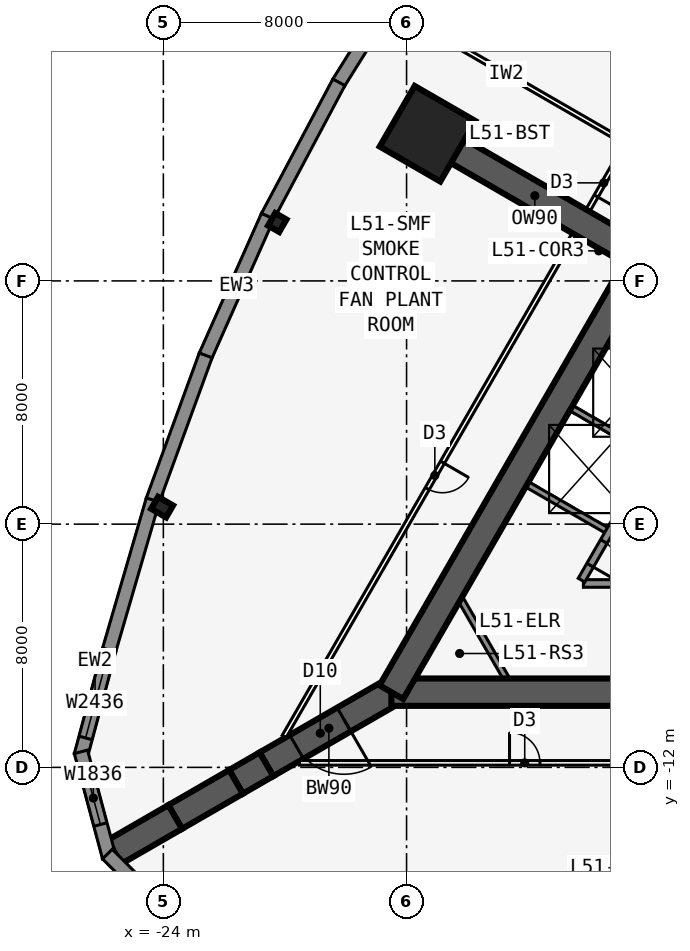
"""IFC4 building model, lengths in metres.
Left out: names, types, materials, properties, quantities, classifications, styles, units other than length and angle.
Written with IfcOpenShell. Run it as: python <this file> out.ifc"""

import sys

from ifc_helpers import new_model, si_unit, direction, frame, frame_2d, origin, origin_2d, place, context, subcontext, project, spatial, polyline, rectangle, i_section, outline, extrude, element, fill, save


model = new_model("IFC4")
c1 = context("Model", 3, precision=1e-05, world=origin(), true_north=direction((0.0, 1.0)))
c2 = subcontext(c1, "Body", "Model", "MODEL_VIEW")
j1 = project(units=[si_unit("LENGTHUNIT", "METRE"), si_unit("PLANEANGLEUNIT", "RADIAN")], contexts=[c1])
p1 = place(None, origin())
s1 = spatial("IfcSite", under=j1, at=p1, CompositionType="ELEMENT")
p2 = place(p1, origin())
s2 = spatial("IfcBuilding", under=s1, at=p2, CompositionType="ELEMENT")
p3 = place(p2, frame((0.0, 0.0, 189.5)))
s3 = spatial("IfcBuildingStorey", under=s2, at=p3, CompositionType="ELEMENT", Elevation=189.5)
p4 = place(p3, frame((-16.5, -9.526, 0.0), z_axis=(0.0, 0.0, 1.0), x_axis=(1.0, 0.0, 0.0)))
e1 = element("IfcWall", 1, at=p4, inside=s3, PredefinedType="SHEAR", context=c2, shape_type="SweptSolid", body=[
    extrude(rectangle(XDim=16.5, YDim=0.9, at=frame_2d((8.25, 0.0))), origin(), (0.0, 0.0, 1.0), 6.4),
])
p5 = place(p4, frame((14.05, 0.0, 0.0)))
e2 = element("IfcOpeningElement", 2, at=p5, cuts=e1, PredefinedType="OPENING", context=c2, shape_type="SweptSolid", body=[
    extrude(rectangle(XDim=1.8, YDim=2.13, at=frame_2d((0.9, 1.065))), frame((0.0, 0.46, 0.0), z_axis=(0.0, -1.0, 0.0), x_axis=(1.0, 0.0, 0.0)), (0.0, 0.0, 1.0), 0.92),
])
p6 = place(p3, frame((-10.183, -5.951, 0.0), z_axis=(0.0, 0.0, 1.0), x_axis=(1.0, 0.0, 0.0)))
e3 = element("IfcWall", 3, at=p6, inside=s3, PredefinedType="SOLIDWALL", context=c2, shape_type="SweptSolid", body=[
    extrude(rectangle(XDim=7.633, YDim=0.25, at=frame_2d((3.816, 0.0))), origin(), (0.0, 0.0, 1.0), 6.15),
])
p7 = place(p3, frame((-8.25, 4.763, 0.0), z_axis=(0.0, 0.0, 1.0), x_axis=(-0.499996545922, -0.866027397988, 0.0)))
e4 = element("IfcWall", 4, at=p7, inside=s3, PredefinedType="SHEAR", context=c2, shape_type="SweptSolid", body=[
    extrude(rectangle(XDim=16.5, YDim=0.9, at=frame_2d((8.25, 0.0))), origin(), (0.0, 0.0, 1.0), 6.4),
])
p8 = place(p3, frame((-4.929, 3.365, 0.0), z_axis=(0.0, 0.0, 1.0), x_axis=(-0.499991433582, -0.866030349552, 0.0)))
e5 = element("IfcWall", 5, at=p8, inside=s3, PredefinedType="SOLIDWALL", context=c2, shape_type="SweptSolid", body=[
    extrude(rectangle(XDim=10.633, YDim=0.25, at=frame_2d((5.316, 0.0))), origin(), (0.0, 0.0, 1.0), 6.15),
])
p9 = place(p8, frame((9.164, 0.0, 0.0)))
e6 = element("IfcOpeningElement", 6, at=p9, cuts=e5, PredefinedType="OPENING", context=c2, shape_type="SweptSolid", body=[
    extrude(rectangle(XDim=0.9, YDim=2.13, at=frame_2d((0.45, 1.065))), frame((0.0, 0.135, 0.0), z_axis=(0.0, -1.0, 0.0), x_axis=(1.0, 0.0, 0.0)), (0.0, 0.0, 1.0), 0.27),
])
for number, where, z_axis, x_axis in (
    (7, (-7.879, -1.744, 0.0), (0.0, 0.0, 1.0), (-0.866, 0.5, 0.0)),
    (8, (-9.329, -4.256, 0.0), (0.0, 0.0, 1.0), (-0.866, 0.5, 0.0)),
):
    element("IfcWall", number, at=place(p3, frame(where, z_axis=z_axis, x_axis=x_axis)), inside=s3, PredefinedType="SOLIDWALL", context=c2, shape_type="SweptSolid", body=[
        extrude(rectangle(XDim=3.125, YDim=0.2, at=frame_2d((1.562, 0.0))), origin(), (0.0, 0.0, 1.0), 6.15),
    ])
p10 = place(p3, frame((-16.5, -9.526, 0.0), z_axis=(0.0, 0.0, 1.0), x_axis=(-0.866031398331, -0.499989616998, 0.0)))
e9 = element("IfcWall", 9, at=p10, inside=s3, PredefinedType="SHEAR", context=c2, shape_type="SweptSolid", body=[
    extrude(rectangle(XDim=4.746, YDim=0.9, at=frame_2d((2.373, 0.0))), origin(), (0.0, 0.0, 1.0), 6.4),
])
p11 = place(p10, frame((1.8, 0.0, 0.0)))
e10 = element("IfcOpeningElement", 10, at=p11, cuts=e9, PredefinedType="OPENING", context=c2, shape_type="SweptSolid", body=[
    extrude(rectangle(XDim=1.8, YDim=2.13, at=frame_2d((0.9, 1.065))), frame((0.0, 0.46, 0.0), z_axis=(0.0, -1.0, 0.0), x_axis=(1.0, 0.0, 0.0)), (0.0, 0.0, 1.0), 0.92),
])
p12 = place(p3, frame((-20.61, -11.899, 0.0), z_axis=(0.0, 0.0, 1.0), x_axis=(-0.866009537788, -0.500027479704, 0.0)))
e11 = element("IfcWall", 11, at=p12, inside=s3, PredefinedType="SHEAR", context=c2, shape_type="SweptSolid", body=[
    extrude(rectangle(XDim=1.155, YDim=0.9, at=frame_2d((0.577, 0.0))), origin(), (0.0, 0.0, 1.0), 6.4),
])
for number, where, z_axis, x_axis in (
    (12, (-21.61, -12.477, 0.0), (0.0, 0.0, 1.0), (-0.866, -0.5, 0.0)),
    (13, (-23.61, -13.631, 0.0), (0.0, 0.0, 1.0), (-0.866, -0.5, 0.0)),
):
    element("IfcWall", number, at=place(p3, frame(where, z_axis=z_axis, x_axis=x_axis)), inside=s3, PredefinedType="SHEAR", context=c2, shape_type="SweptSolid", body=[
        extrude(rectangle(XDim=2.309, YDim=0.9, at=frame_2d((1.155, 0.0))), origin(), (0.0, 0.0, 1.0), 6.4),
    ])
p13 = place(p3, frame((-8.25, 4.763, 0.0), z_axis=(0.0, 0.0, 1.0), x_axis=(-0.866023543838, 0.500003221507, 0.0)))
e14 = element("IfcWall", 14, at=p13, inside=s3, PredefinedType="SHEAR", context=c2, shape_type="SweptSolid", body=[
    extrude(rectangle(XDim=8.154, YDim=0.9, at=frame_2d((4.077, 0.0))), origin(), (0.0, 0.0, 1.0), 6.4),
])
p14 = place(p3, frame((-20.254, 5.92, 0.0), z_axis=(0.0, 0.0, 1.0), x_axis=(-0.866025403784, 0.5, 0.0)))
e15 = element("IfcColumn", 15, at=p14, inside=s3, PredefinedType="COLUMN", context=c2, shape_type="SweptSolid", body=[
    extrude(i_section(OverallWidth=0.424, OverallDepth=0.475, WebThickness=0.048, FlangeThickness=0.077, at=origin_2d()), origin(), (0.0, 0.0, 1.0), 6.4),
])
p15 = place(p3, frame((-24.041, -3.44, 0.0), z_axis=(0.0, 0.0, 1.0), x_axis=(-0.5, -0.866025403784, 0.0)))
e16 = element("IfcColumn", 16, at=p15, inside=s3, PredefinedType="COLUMN", context=c2, shape_type="SweptSolid", body=[
    extrude(i_section(OverallWidth=0.455, OverallDepth=0.569, WebThickness=0.078, FlangeThickness=0.125, at=origin_2d()), origin(), (0.0, 0.0, 1.0), 6.4),
])
p16 = place(p3, frame((-15.312, 8.84, 0.0), z_axis=(0.0, 0.0, 1.0), x_axis=(-0.866025403784, 0.5, 0.0)))
e17 = element("IfcColumn", 17, at=p16, inside=s3, PredefinedType="COLUMN", context=c2, shape_type="SweptSolid", body=[
    extrude(rectangle(XDim=2.3, YDim=2.3, at=origin_2d()), origin(), (0.0, 0.0, 1.0), 6.4),
])
p17 = place(p3, frame((-15.583, 14.761, 0.0), z_axis=(0.0, 0.0, 1.0), x_axis=(-0.529990167382, -0.84800378683, 0.0)))
e18 = element("IfcWall", 18, at=p17, inside=s3, PredefinedType="SOLIDWALL", context=c2, shape_type="SweptSolid", body=[
    extrude(outline(polyline([(0.0, 0.0), (5.003, 0.0), (5.003, 6.15), (0.0, 6.15), (0.0, 0.0)]), holes=[polyline([(4.402, 3.075), (4.337, 3.567), (4.147, 4.025), (3.845, 4.418), (3.451, 4.72), (2.993, 4.91), (2.501, 4.975), (2.01, 4.91), (1.552, 4.72), (1.158, 4.418), (0.856, 4.025), (0.666, 3.567), (0.602, 3.075), (0.666, 2.583), (0.856, 2.125), (1.158, 1.731), (1.552, 1.43), (2.01, 1.24), (2.501, 1.175), (2.993, 1.24), (3.451, 1.43), (3.845, 1.731), (4.147, 2.125), (4.337, 2.583), (4.402, 3.075)])]), frame((0.0, 0.225, 0.0), z_axis=(0.0, -1.0, 0.0), x_axis=(1.0, 0.0, 0.0)), (0.0, 0.0, 1.0), 0.45),
])
p18 = place(p3, frame((-18.226, 10.532, 0.0), z_axis=(0.0, 0.0, 1.0), x_axis=(-0.469404966864, -0.882982999317, 0.0)))
e19 = element("IfcWall", 19, at=p18, inside=s3, PredefinedType="SOLIDWALL", context=c2, shape_type="SweptSolid", body=[
    extrude(outline(polyline([(0.0, 0.0), (5.003, 0.0), (5.003, 6.15), (0.0, 6.15), (0.0, 0.0)]), holes=[polyline([(4.402, 3.075), (4.337, 3.567), (4.147, 4.025), (3.845, 4.418), (3.451, 4.72), (2.993, 4.91), (2.501, 4.975), (2.01, 4.91), (1.552, 4.72), (1.158, 4.418), (0.856, 4.025), (0.666, 3.567), (0.602, 3.075), (0.666, 2.583), (0.856, 2.125), (1.158, 1.731), (1.552, 1.43), (2.01, 1.24), (2.501, 1.175), (2.993, 1.24), (3.451, 1.43), (3.845, 1.731), (4.147, 2.125), (4.337, 2.583), (4.402, 3.075)])]), frame((0.0, 0.225, 0.0), z_axis=(0.0, -1.0, 0.0), x_axis=(1.0, 0.0, 0.0)), (0.0, 0.0, 1.0), 0.45),
])
p19 = place(p3, frame((-20.568, 6.128, 0.0), z_axis=(0.0, 0.0, 1.0), x_axis=(-0.406850247885, -0.913494869058, 0.0)))
e20 = element("IfcWall", 20, at=p19, inside=s3, PredefinedType="SOLIDWALL", context=c2, shape_type="SweptSolid", body=[
    extrude(outline(polyline([(0.0, 0.0), (5.027, 0.0), (5.027, 6.15), (0.0, 6.15), (0.0, 0.0)]), holes=[polyline([(4.414, 3.075), (4.349, 3.567), (4.159, 4.025), (3.857, 4.418), (3.464, 4.72), (3.006, 4.91), (2.514, 4.975), (2.022, 4.91), (1.564, 4.72), (1.17, 4.418), (0.868, 4.025), (0.678, 3.567), (0.614, 3.075), (0.678, 2.583), (0.868, 2.125), (1.17, 1.731), (1.564, 1.43), (2.022, 1.24), (2.514, 1.175), (3.006, 1.24), (3.464, 1.43), (3.857, 1.731), (4.159, 2.125), (4.349, 2.583), (4.414, 3.075)])]), frame((0.0, 0.225, 0.0), z_axis=(0.0, -1.0, 0.0), x_axis=(1.0, 0.0, 0.0)), (0.0, 0.0, 1.0), 0.45),
])
p20 = place(p3, frame((-22.607, 1.55, 0.0), z_axis=(0.0, 0.0, 1.0), x_axis=(-0.343210088389, -0.939258662578, 0.0)))
e21 = element("IfcWall", 21, at=p20, inside=s3, PredefinedType="SOLIDWALL", context=c2, shape_type="SweptSolid", body=[
    extrude(outline(polyline([(0.0, 0.0), (5.076, 0.0), (5.076, 6.15), (0.0, 6.15), (0.0, 0.0)]), holes=[polyline([(4.438, 3.075), (4.373, 3.567), (4.184, 4.025), (3.882, 4.418), (3.488, 4.72), (3.03, 4.91), (2.538, 4.975), (2.046, 4.91), (1.588, 4.72), (1.195, 4.418), (0.893, 4.025), (0.703, 3.567), (0.638, 3.075), (0.703, 2.583), (0.893, 2.125), (1.195, 1.731), (1.588, 1.43), (2.046, 1.24), (2.538, 1.175), (3.03, 1.24), (3.488, 1.43), (3.882, 1.731), (4.184, 2.125), (4.373, 2.583), (4.438, 3.075)])]), frame((0.0, 0.225, 0.0), z_axis=(0.0, -1.0, 0.0), x_axis=(1.0, 0.0, 0.0)), (0.0, 0.0, 1.0), 0.45),
])
p21 = place(p3, frame((-24.345, -3.203, 0.0), z_axis=(0.0, 0.0, 1.0), x_axis=(-0.279528287117, -0.960137457191, 0.0)))
e22 = element("IfcWall", 22, at=p21, inside=s3, PredefinedType="SOLIDWALL", context=c2, shape_type="SweptSolid", body=[
    extrude(outline(polyline([(0.0, 0.0), (5.148, 0.0), (5.148, 6.15), (0.0, 6.15), (0.0, 0.0)]), holes=[polyline([(4.524, 3.075), (4.458, 3.58), (4.263, 4.05), (3.953, 4.454), (3.549, 4.764), (3.079, 4.958), (2.574, 5.025), (2.069, 4.958), (1.599, 4.764), (1.195, 4.454), (0.885, 4.05), (0.69, 3.58), (0.624, 3.075), (0.69, 2.57), (0.885, 2.1), (1.195, 1.696), (1.599, 1.386), (2.069, 1.191), (2.574, 1.125), (3.079, 1.191), (3.549, 1.386), (3.953, 1.696), (4.263, 2.1), (4.458, 2.57), (4.524, 3.075)])]), frame((0.0, 0.225, 0.0), z_axis=(0.0, -1.0, 0.0), x_axis=(1.0, 0.0, 0.0)), (0.0, 0.0, 1.0), 0.45),
])
p22 = place(p3, frame((-25.783, -8.141, 0.0), z_axis=(0.0, 0.0, 1.0), x_axis=(-0.258823421857, -0.965924653531, 0.0)))
e23 = element("IfcWall", 23, at=p22, inside=s3, PredefinedType="SOLIDWALL", context=c2, shape_type="SweptSolid", body=[
    extrude(rectangle(XDim=3.586, YDim=0.45, at=frame_2d((1.793, 0.0))), origin(), (0.0, 0.0, 1.0), 6.15),
])
p23 = place(p22, frame((0.593, 0.0, 1.2)))
e24 = element("IfcOpeningElement", 24, at=p23, cuts=e23, PredefinedType="OPENING", context=c2, shape_type="SweptSolid", body=[
    extrude(rectangle(XDim=2.4, YDim=3.6, at=frame_2d((1.2, 1.8))), frame((0.0, 0.235, 0.0), z_axis=(0.0, -1.0, 0.0), x_axis=(1.0, 0.0, 0.0)), (0.0, 0.0, 1.0), 0.47),
])
p24 = place(p3, frame((-26.711, -11.489, 0.0), z_axis=(0.0, 0.0, 1.0), x_axis=(0.258823421857, -0.965924653531, 0.0)))
e25 = element("IfcWall", 25, at=p24, inside=s3, PredefinedType="SOLIDWALL", context=c2, shape_type="SweptSolid", body=[
    extrude(outline(polyline([(3.586, 0.225), (3.527, 0.225), (3.035, 0.093), (3.0, 0.225), (0.0, 0.225), (0.0, -0.225), (3.586, -0.225), (3.586, 0.225)])), origin(), (0.0, 0.0, 1.0), 6.15),
])
p25 = place(p24, frame((0.675, 0.0, 1.2)))
e26 = element("IfcOpeningElement", 26, at=p25, cuts=e25, PredefinedType="OPENING", context=c2, shape_type="SweptSolid", body=[
    extrude(rectangle(XDim=1.8, YDim=3.6, at=frame_2d((0.9, 1.8))), frame((0.0, 0.235, 0.0), z_axis=(0.0, -1.0, 0.0), x_axis=(1.0, 0.0, 0.0)), (0.0, 0.0, 1.0), 0.47),
])
p26 = place(p3, frame((-25.841, -14.852, 0.0), z_axis=(0.0, 0.0, 1.0), x_axis=(0.707106781187, -0.707106781187, 0.0)))
e27 = element("IfcWall", 27, at=p26, inside=s3, PredefinedType="SOLIDWALL", context=c2, shape_type="SweptSolid", body=[
    extrude(outline(polyline([(3.586, 0.225), (0.586, 0.225), (0.551, 0.093), (0.059, 0.225), (0.0, 0.225), (0.0, -0.225), (3.586, -0.225), (3.586, 0.225)])), origin(), (0.0, 0.0, 1.0), 6.15),
])
p27 = place(p26, frame((1.111, 0.0, 1.2)))
e28 = element("IfcOpeningElement", 28, at=p27, cuts=e27, PredefinedType="OPENING", context=c2, shape_type="SweptSolid", body=[
    extrude(rectangle(XDim=1.8, YDim=3.6, at=frame_2d((0.9, 1.8))), frame((0.0, 0.235, 0.0), z_axis=(0.0, -1.0, 0.0), x_axis=(1.0, 0.0, 0.0)), (0.0, 0.0, 1.0), 0.47),
])
p28 = place(p3, frame((-19.527, -11.851, 0.0), z_axis=(0.0, 0.0, 1.0), x_axis=(1.0, 0.0, 0.0)))
e29 = element("IfcWall", 29, at=p28, inside=s3, PredefinedType="PARTITIONING", context=c2, shape_type="SweptSolid", body=[
    extrude(rectangle(XDim=39.054, YDim=0.15, at=frame_2d((19.527, 0.0))), origin(), (0.0, 0.0, 1.0), 6.15),
])
p29 = place(p28, frame((6.914, 0.0, 0.0)))
e30 = element("IfcOpeningElement", 30, at=p29, cuts=e29, PredefinedType="OPENING", context=c2, shape_type="SweptSolid", body=[
    extrude(rectangle(XDim=1.0, YDim=2.13, at=frame_2d((0.5, 1.065))), frame((0.0, 0.085, 0.0), z_axis=(0.0, -1.0, 0.0), x_axis=(1.0, 0.0, 0.0)), (0.0, 0.0, 1.0), 0.17),
])
p30 = place(p28, frame((16.527, 0.0, 0.0)))
e31 = element("IfcOpeningElement", 31, at=p30, cuts=e29, PredefinedType="OPENING", context=c2, shape_type="SweptSolid", body=[
    extrude(rectangle(XDim=1.0, YDim=2.13, at=frame_2d((0.5, 1.065))), frame((0.0, 0.085, 0.0), z_axis=(0.0, -1.0, 0.0), x_axis=(1.0, 0.0, 0.0)), (0.0, 0.0, 1.0), 0.17),
])
p31 = place(p28, frame((28.64, 0.0, 0.0)))
e32 = element("IfcOpeningElement", 32, at=p31, cuts=e29, PredefinedType="OPENING", context=c2, shape_type="SweptSolid", body=[
    extrude(rectangle(XDim=1.0, YDim=2.13, at=frame_2d((0.5, 1.065))), frame((0.0, 0.085, 0.0), z_axis=(0.0, -1.0, 0.0), x_axis=(1.0, 0.0, 0.0)), (0.0, 0.0, 1.0), 0.17),
])
p32 = place(p3, frame((-0.5, 22.836, 0.0), z_axis=(0.0, 0.0, 1.0), x_axis=(-0.500001677587, -0.866024435227, 0.0)))
e33 = element("IfcWall", 33, at=p32, inside=s3, PredefinedType="PARTITIONING", context=c2, shape_type="SweptSolid", body=[
    extrude(rectangle(XDim=39.054, YDim=0.15, at=frame_2d((19.527, 0.0))), origin(), (0.0, 0.0, 1.0), 6.15),
])
p33 = place(p32, frame((7.914, 0.0, 0.0)))
e34 = element("IfcOpeningElement", 34, at=p33, cuts=e33, PredefinedType="OPENING", context=c2, shape_type="SweptSolid", body=[
    extrude(rectangle(XDim=1.0, YDim=2.13, at=frame_2d((0.5, 1.065))), frame((0.0, 0.085, 0.0), z_axis=(0.0, -1.0, 0.0), x_axis=(1.0, 0.0, 0.0)), (0.0, 0.0, 1.0), 0.17),
])
p34 = place(p32, frame((17.527, 0.0, 0.0)))
e35 = element("IfcOpeningElement", 35, at=p34, cuts=e33, PredefinedType="OPENING", context=c2, shape_type="SweptSolid", body=[
    extrude(rectangle(XDim=1.0, YDim=2.13, at=frame_2d((0.5, 1.065))), frame((0.0, 0.085, 0.0), z_axis=(0.0, -1.0, 0.0), x_axis=(1.0, 0.0, 0.0)), (0.0, 0.0, 1.0), 0.17),
])
p35 = place(p32, frame((28.64, 0.0, 0.0)))
e36 = element("IfcOpeningElement", 36, at=p35, cuts=e33, PredefinedType="OPENING", context=c2, shape_type="SweptSolid", body=[
    extrude(rectangle(XDim=1.0, YDim=2.13, at=frame_2d((0.5, 1.065))), frame((0.0, 0.085, 0.0), z_axis=(0.0, -1.0, 0.0), x_axis=(1.0, 0.0, 0.0)), (0.0, 0.0, 1.0), 0.17),
])
p36 = place(p3, frame((-8.829, 8.561, 0.0), z_axis=(0.0, 0.0, 1.0), x_axis=(-0.866021034389, 0.500007567939, 0.0)))
e37 = element("IfcWall", 37, at=p36, inside=s3, PredefinedType="PARTITIONING", context=c2, shape_type="SweptSolid", body=[
    extrude(rectangle(XDim=8.993, YDim=0.15, at=frame_2d((4.497, 0.0))), origin(), (0.0, 0.0, 1.0), 6.15),
])
p37 = place(p3, frame((-12.719, -9.076, 0.0), z_axis=(0.0, 0.0, 1.0), x_axis=(-0.499952404951, 0.866052881055, 0.0)))
e38 = element("IfcWall", 38, at=p37, inside=s3, PredefinedType="SOLIDWALL", context=c2, shape_type="SweptSolid", body=[
    extrude(rectangle(XDim=3.002, YDim=0.2, at=frame_2d((1.501, 0.0))), origin(), (0.0, 0.0, 1.0), 6.15),
])
p38 = place(p23, origin())
e39 = element("IfcWindow", 39, at=p38, inside=s3, PartitioningType="SINGLE_PANEL", PredefinedType="WINDOW", context=c2, shape_type="SweptSolid", body=[
    extrude(rectangle(XDim=2.4, YDim=3.6, at=frame_2d((1.2, 1.8))), frame((0.0, 0.03, 0.0), z_axis=(0.0, -1.0, 0.0), x_axis=(1.0, 0.0, 0.0)), (0.0, 0.0, 1.0), 0.06),
])
fill(e24, e39)
p39 = place(p25, origin())
e40 = element("IfcWindow", 40, at=p39, inside=s3, PartitioningType="SINGLE_PANEL", PredefinedType="WINDOW", context=c2, shape_type="SweptSolid", body=[
    extrude(rectangle(XDim=1.8, YDim=3.6, at=frame_2d((0.9, 1.8))), frame((0.0, 0.03, 0.0), z_axis=(0.0, -1.0, 0.0), x_axis=(1.0, 0.0, 0.0)), (0.0, 0.0, 1.0), 0.06),
])
fill(e26, e40)
p40 = place(p29, origin())
e41 = element("IfcDoor", 41, at=p40, inside=s3, OperationType="SINGLE_SWING_LEFT", PredefinedType="DOOR", context=c2, shape_type="SweptSolid", body=[
    extrude(rectangle(XDim=1.0, YDim=2.13, at=frame_2d((0.5, 1.065))), frame((0.0, 0.025, 0.0), z_axis=(0.0, -1.0, 0.0), x_axis=(1.0, 0.0, 0.0)), (0.0, 0.0, 1.0), 0.05),
])
fill(e30, e41)
p41 = place(p34, origin())
e42 = element("IfcDoor", 42, at=p41, inside=s3, OperationType="SINGLE_SWING_RIGHT", PredefinedType="DOOR", context=c2, shape_type="SweptSolid", body=[
    extrude(rectangle(XDim=1.0, YDim=2.13, at=frame_2d((0.5, 1.065))), frame((0.0, 0.025, 0.0), z_axis=(0.0, -1.0, 0.0), x_axis=(1.0, 0.0, 0.0)), (0.0, 0.0, 1.0), 0.05),
])
fill(e35, e42)
p42 = place(p35, origin())
e43 = element("IfcDoor", 43, at=p42, inside=s3, OperationType="SINGLE_SWING_LEFT", PredefinedType="DOOR", context=c2, shape_type="SweptSolid", body=[
    extrude(rectangle(XDim=1.0, YDim=2.13, at=frame_2d((0.5, 1.065))), frame((0.0, 0.025, 0.0), z_axis=(0.0, -1.0, 0.0), x_axis=(1.0, 0.0, 0.0)), (0.0, 0.0, 1.0), 0.05),
])
fill(e36, e43)
p43 = place(p11, origin())
e44 = element("IfcDoor", 44, at=p43, inside=s3, OperationType="DOUBLE_DOOR_DOUBLE_SWING", PredefinedType="DOOR", context=c2, shape_type="SweptSolid", body=[
    extrude(rectangle(XDim=1.8, YDim=2.13, at=frame_2d((0.9, 1.065))), frame((0.0, 0.025, 0.0), z_axis=(0.0, -1.0, 0.0), x_axis=(1.0, 0.0, 0.0)), (0.0, 0.0, 1.0), 0.05),
])
fill(e10, e44)
p44 = place(p9, origin())
e45 = element("IfcDoor", 45, at=p44, inside=s3, OperationType="SINGLE_SWING_RIGHT", PredefinedType="DOOR", context=c2, shape_type="SweptSolid", body=[
    extrude(rectangle(XDim=0.9, YDim=2.13, at=frame_2d((0.45, 1.065))), frame((0.0, 0.025, 0.0), z_axis=(0.0, -1.0, 0.0), x_axis=(1.0, 0.0, 0.0)), (0.0, 0.0, 1.0), 0.05),
])
fill(e6, e45)
save(model, sys.argv[1])
